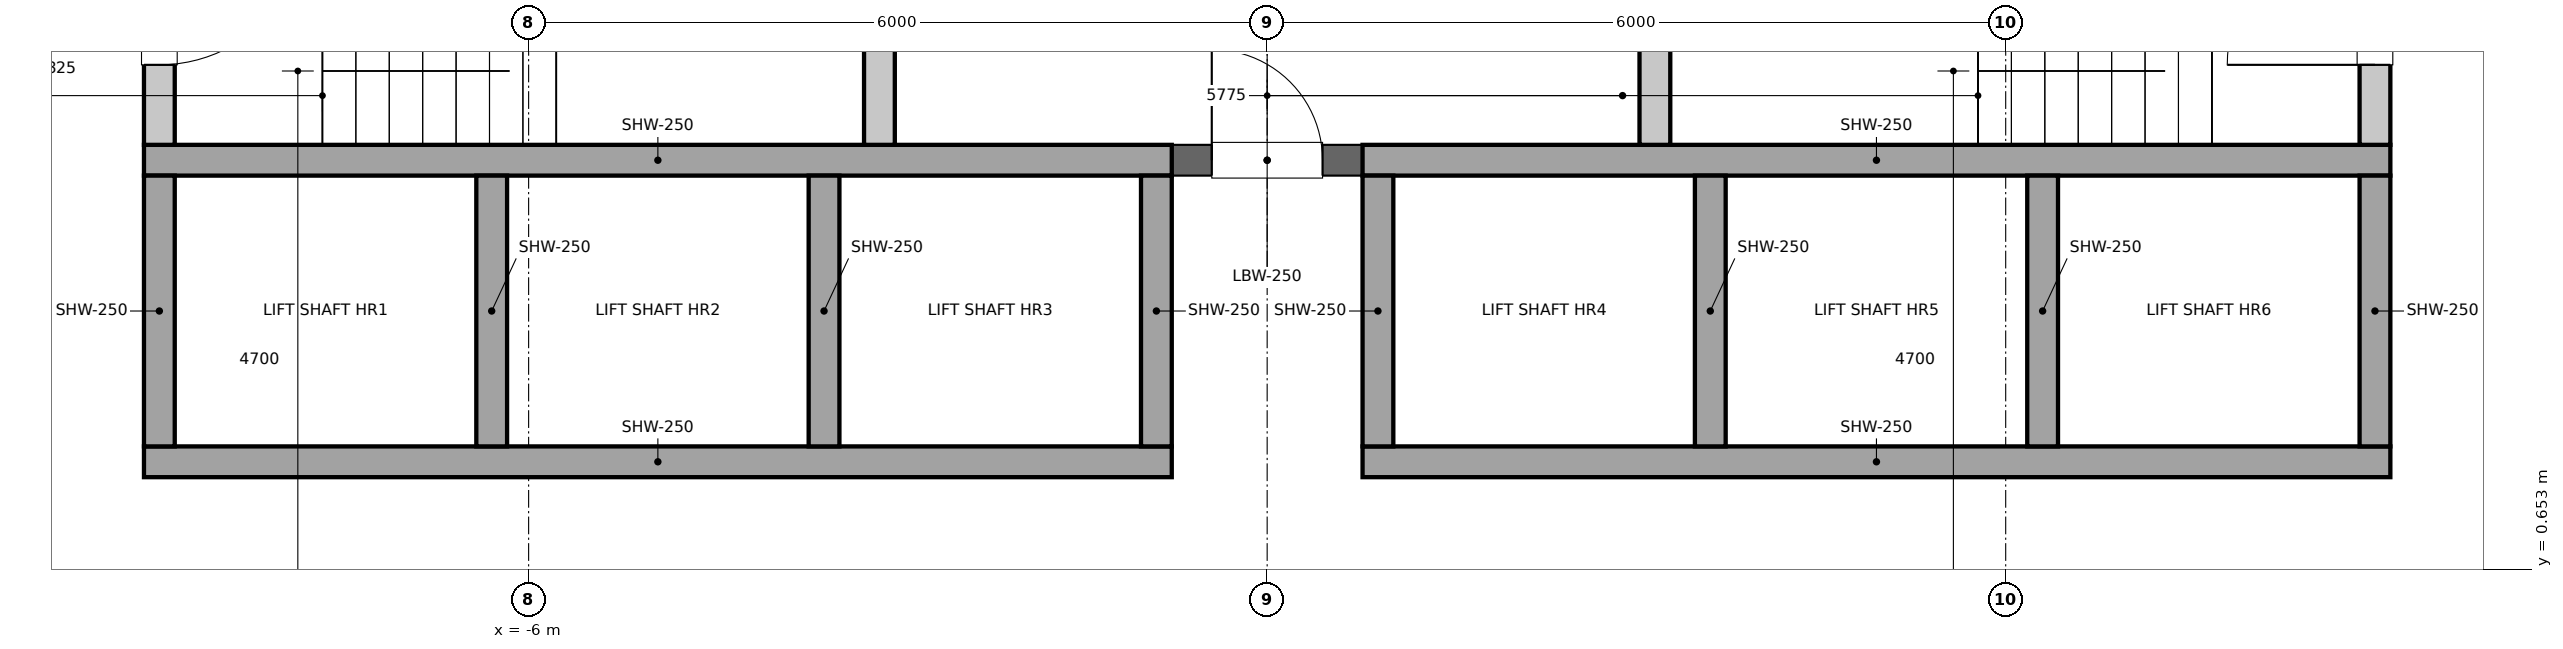
"""IFC4 building model, lengths in metres.
Left out: names, types, materials, properties, quantities, classifications, styles, units other than length and angle.
Written with IfcOpenShell. Run it as: python <this file> out.ifc"""

import sys

from ifc_helpers import new_model, si_unit, direction, frame, frame_2d, origin, place, context, subcontext, project, spatial, rectangle, extrude, element, fill, save


model = new_model("IFC4")
c1 = context("Model", 3, precision=1e-05, world=origin(), true_north=direction((0.0, 1.0)))
c2 = subcontext(c1, "Body", "Model", "MODEL_VIEW")
j1 = project(units=[si_unit("LENGTHUNIT", "METRE"), si_unit("PLANEANGLEUNIT", "RADIAN")], contexts=[c1])
p1 = place(None, origin())
s1 = spatial("IfcSite", under=j1, at=p1, CompositionType="ELEMENT")
p2 = place(p1, origin())
s2 = spatial("IfcBuilding", under=s1, at=p2, CompositionType="ELEMENT")
p3 = place(p2, frame((0.0, 0.0, 197.6)))
s3 = spatial("IfcBuildingStorey", under=s2, at=p3, CompositionType="ELEMENT", Elevation=197.6)
p4 = place(p3, frame((-9.0, 4.1, 0.0), z_axis=(0.0, 0.0, 1.0), x_axis=(0.0, 1.0, 0.0)))
e1 = element("IfcWall", 1, at=p4, inside=s3, PredefinedType="SOLIDWALL", context=c2, shape_type="SweptSolid", body=[
    extrude(rectangle(XDim=2.5, YDim=0.25, at=frame_2d((1.25, 0.0))), origin(), (0.0, 0.0, 1.0), 5.2),
])
p5 = place(p4, frame((0.65, 0.0, 0.0)))
e2 = element("IfcOpeningElement", 2, at=p5, cuts=e1, PredefinedType="OPENING", context=c2, shape_type="SweptSolid", body=[
    extrude(rectangle(XDim=1.2, YDim=2.1, at=frame_2d((0.6, 1.05))), frame((0.0, 0.125, 0.0), z_axis=(0.0, -1.0, 0.0), x_axis=(1.0, 0.0, 0.0)), (0.0, 0.0, 1.0), 0.25),
])
p6 = place(p3, frame((9.0, 4.1, 0.0), z_axis=(0.0, 0.0, 1.0), x_axis=(0.0, 1.0, 0.0)))
e3 = element("IfcWall", 3, at=p6, inside=s3, PredefinedType="SOLIDWALL", context=c2, shape_type="SweptSolid", body=[
    extrude(rectangle(XDim=2.5, YDim=0.25, at=frame_2d((1.25, 0.0))), origin(), (0.0, 0.0, 1.0), 5.2),
])
p7 = place(p6, frame((0.65, 0.0, 0.0)))
e4 = element("IfcOpeningElement", 4, at=p7, cuts=e3, PredefinedType="OPENING", context=c2, shape_type="SweptSolid", body=[
    extrude(rectangle(XDim=1.2, YDim=2.1, at=frame_2d((0.6, 1.05))), frame((0.0, 0.125, 0.0), z_axis=(0.0, -1.0, 0.0), x_axis=(1.0, 0.0, 0.0)), (0.0, 0.0, 1.0), 0.25),
])
for number, where, z_axis, x_axis in (
    (5, (-3.15, 4.1, 0.0), (0.0, 0.0, 1.0), (0.0, 1.0, 0.0)),
    (6, (3.15, 4.1, 0.0), (0.0, 0.0, 1.0), (0.0, 1.0, 0.0)),
):
    element("IfcWall", number, at=place(p3, frame(where, z_axis=z_axis, x_axis=x_axis)), inside=s3, PredefinedType="SOLIDWALL", context=c2, shape_type="SweptSolid", body=[
        extrude(rectangle(XDim=2.5, YDim=0.25, at=frame_2d((1.25, 0.0))), origin(), (0.0, 0.0, 1.0), 5.2),
    ])
p8 = place(p3, frame((-0.775, 3.975, 0.0), z_axis=(0.0, 0.0, 1.0), x_axis=(1.0, 0.0, 0.0)))
e7 = element("IfcWall", 7, at=p8, inside=s3, PredefinedType="PARTITIONING", context=c2, shape_type="SweptSolid", body=[
    extrude(rectangle(XDim=1.55, YDim=0.25, at=frame_2d((0.775, 0.0))), origin(), (0.0, 0.0, 1.0), 5.2),
])
p9 = place(p8, frame((0.325, 0.0, 0.0)))
e8 = element("IfcOpeningElement", 8, at=p9, cuts=e7, PredefinedType="OPENING", context=c2, shape_type="SweptSolid", body=[
    extrude(rectangle(XDim=0.9, YDim=2.1, at=frame_2d((0.45, 1.05))), frame((0.0, 0.125, 0.0), z_axis=(0.0, -1.0, 0.0), x_axis=(1.0, 0.0, 0.0)), (0.0, 0.0, 1.0), 0.25),
])
for number, where, z_axis, x_axis in (
    (9, (-9.125, 1.525, 0.0), (0.0, 0.0, 1.0), (1.0, 0.0, 0.0)),
    (10, (0.775, 1.525, 0.0), (0.0, 0.0, 1.0), (1.0, 0.0, 0.0)),
    (11, (-9.125, 3.975, 0.0), (0.0, 0.0, 1.0), (1.0, 0.0, 0.0)),
    (12, (0.775, 3.975, 0.0), (0.0, 0.0, 1.0), (1.0, 0.0, 0.0)),
):
    element("IfcWall", number, at=place(p3, frame(where, z_axis=z_axis, x_axis=x_axis)), inside=s3, PredefinedType="SOLIDWALL", context=c2, shape_type="SweptSolid", body=[
        extrude(rectangle(XDim=8.35, YDim=0.25, at=frame_2d((4.175, 0.0))), origin(), (0.0, 0.0, 1.0), 5.2),
    ])
for number, where, z_axis, x_axis in (
    (13, (-9.0, 1.65, 0.0), (0.0, 0.0, 1.0), (0.0, 1.0, 0.0)),
    (14, (9.0, 1.65, 0.0), (0.0, 0.0, 1.0), (0.0, 1.0, 0.0)),
    (15, (-6.3, 1.65, 0.0), (0.0, 0.0, 1.0), (0.0, 1.0, 0.0)),
    (16, (6.3, 1.65, 0.0), (0.0, 0.0, 1.0), (0.0, 1.0, 0.0)),
    (17, (-3.6, 1.65, 0.0), (0.0, 0.0, 1.0), (0.0, 1.0, 0.0)),
    (18, (3.6, 1.65, 0.0), (0.0, 0.0, 1.0), (0.0, 1.0, 0.0)),
    (19, (-0.9, 1.65, 0.0), (0.0, 0.0, 1.0), (0.0, 1.0, 0.0)),
    (20, (0.9, 1.65, 0.0), (0.0, 0.0, 1.0), (0.0, 1.0, 0.0)),
):
    element("IfcWall", number, at=place(p3, frame(where, z_axis=z_axis, x_axis=x_axis)), inside=s3, PredefinedType="SOLIDWALL", context=c2, shape_type="SweptSolid", body=[
        extrude(rectangle(XDim=2.2, YDim=0.25, at=frame_2d((1.1, 0.0))), origin(), (0.0, 0.0, 1.0), 5.2),
    ])
p10 = place(p5, origin())
e21 = element("IfcDoor", 21, at=p10, inside=s3, OperationType="SINGLE_SWING_RIGHT", PredefinedType="DOOR", context=c2, shape_type="SweptSolid", body=[
    extrude(rectangle(XDim=1.2, YDim=2.1, at=frame_2d((0.6, 1.05))), frame((0.0, 0.025, 0.0), z_axis=(0.0, -1.0, 0.0), x_axis=(1.0, 0.0, 0.0)), (0.0, 0.0, 1.0), 0.05),
])
fill(e2, e21)
p11 = place(p7, origin())
e22 = element("IfcDoor", 22, at=p11, inside=s3, OperationType="SINGLE_SWING_LEFT", PredefinedType="DOOR", context=c2, shape_type="SweptSolid", body=[
    extrude(rectangle(XDim=1.2, YDim=2.1, at=frame_2d((0.6, 1.05))), frame((0.0, 0.025, 0.0), z_axis=(0.0, -1.0, 0.0), x_axis=(1.0, 0.0, 0.0)), (0.0, 0.0, 1.0), 0.05),
])
fill(e4, e22)
p12 = place(p9, origin())
e23 = element("IfcDoor", 23, at=p12, inside=s3, OperationType="SINGLE_SWING_LEFT", PredefinedType="DOOR", context=c2, shape_type="SweptSolid", body=[
    extrude(rectangle(XDim=0.9, YDim=2.1, at=frame_2d((0.45, 1.05))), frame((0.0, 0.025, 0.0), z_axis=(0.0, -1.0, 0.0), x_axis=(1.0, 0.0, 0.0)), (0.0, 0.0, 1.0), 0.05),
])
fill(e8, e23)
save(model, sys.argv[1])
